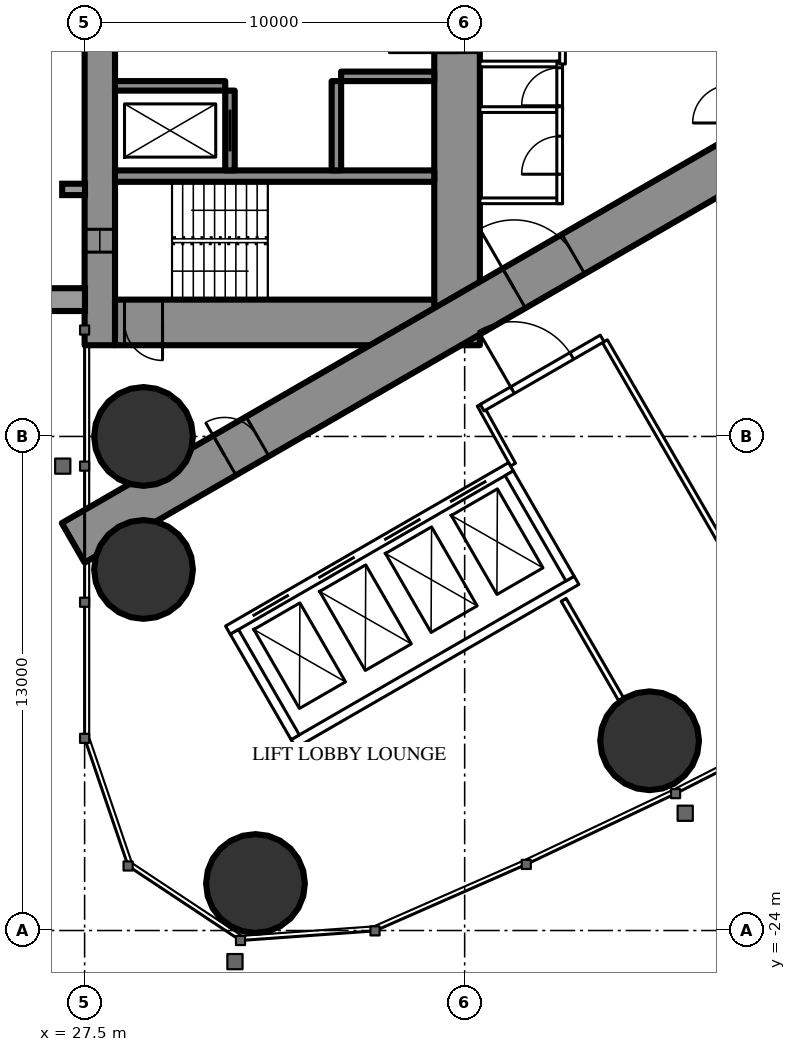
"""IFC4 building model, lengths in metres.
Left out: names, types, materials, properties, quantities, classifications, styles, units other than length and angle.
Written with IfcOpenShell. Run it as: python <this file> out.ifc"""

import sys

from ifc_helpers import new_model, si_unit, direction, frame, frame_2d, origin, origin_2d, place, context, subcontext, project, spatial, rectangle, hollow_circle, extrude, element, fill, save


model = new_model("IFC4")
c1 = context("Model", 3, precision=1e-05, world=origin(), true_north=direction((0.0, 1.0)))
c2 = subcontext(c1, "Body", "Model", "MODEL_VIEW")
j1 = project(units=[si_unit("LENGTHUNIT", "METRE"), si_unit("PLANEANGLEUNIT", "RADIAN")], contexts=[c1])
p1 = place(None, origin())
s1 = spatial("IfcSite", under=j1, at=p1, CompositionType="ELEMENT")
p2 = place(p1, origin())
s2 = spatial("IfcBuilding", under=s1, at=p2, CompositionType="ELEMENT")
p3 = place(p2, frame((0.0, 0.0, 125.6)))
s3 = spatial("IfcBuildingStorey", under=s2, at=p3, CompositionType="ELEMENT", Elevation=125.6)
for number, where, z_axis, x_axis in (
    (1, (31.996, -22.763, 0.0), (0.0, 0.0, 1.0), (1.0, 0.0, 0.0)),
    (2, (29.05, -11.0, 0.0), (0.0, 0.0, 1.0), (1.0, 0.0, 0.0)),
    (3, (29.05, -14.5, 0.0), (0.0, 0.0, 1.0), (1.0, 0.0, 0.0)),
    (4, (42.366, -19.007, 0.0), (0.0, 0.0, 1.0), (1.0, 0.0, 0.0)),
):
    element("IfcColumn", number, at=place(p3, frame(where, z_axis=z_axis, x_axis=x_axis)), inside=s3, PredefinedType="COLUMN", context=c2, shape_type="SweptSolid", body=[
        extrude(hollow_circle(Radius=1.3, WallThickness=0.1, at=origin_2d()), origin(), (0.0, 0.0, 1.0), 3.5),
    ])
p4 = place(p3, frame((27.9, -8.6, 0.0), z_axis=(0.0, 0.0, 1.0), x_axis=(0.0, 1.0, 0.0)))
e5 = element("IfcWall", 5, at=p4, inside=s3, PredefinedType="SHEAR", context=c2, shape_type="SweptSolid", body=[
    extrude(rectangle(XDim=17.2, YDim=0.8, at=frame_2d((8.6, 0.0))), origin(), (0.0, 0.0, 1.0), 3.5),
])
p5 = place(p4, frame((2.45, 0.0, 0.6)))
e6 = element("IfcOpeningElement", 6, at=p5, cuts=e5, PredefinedType="OPENING", context=c2, shape_type="SweptSolid", body=[
    extrude(rectangle(XDim=0.6, YDim=2.1, at=frame_2d((0.3, 1.05))), frame((0.0, 0.41, 0.0), z_axis=(0.0, -1.0, 0.0), x_axis=(1.0, 0.0, 0.0)), (0.0, 0.0, 1.0), 0.82),
])
p6 = place(p4, frame((14.15, 0.0, 0.6)))
e7 = element("IfcOpeningElement", 7, at=p6, cuts=e5, PredefinedType="OPENING", context=c2, shape_type="SweptSolid", body=[
    extrude(rectangle(XDim=0.6, YDim=2.1, at=frame_2d((0.3, 1.05))), frame((0.0, 0.41, 0.0), z_axis=(0.0, -1.0, 0.0), x_axis=(1.0, 0.0, 0.0)), (0.0, 0.0, 1.0), 0.82),
])
p7 = place(p3, frame((37.3, -8.6, 0.0), z_axis=(0.0, 0.0, 1.0), x_axis=(0.0, 1.0, 0.0)))
e8 = element("IfcWall", 8, at=p7, inside=s3, PredefinedType="SHEAR", context=c2, shape_type="SweptSolid", body=[
    extrude(rectangle(XDim=17.2, YDim=1.2, at=frame_2d((8.6, 0.0))), origin(), (0.0, 0.0, 1.0), 3.5),
])
p8 = place(p7, frame((7.7, 0.0, 0.0)))
e9 = element("IfcOpeningElement", 9, at=p8, cuts=e8, PredefinedType="OPENING", context=c2, shape_type="SweptSolid", body=[
    extrude(rectangle(XDim=1.8, YDim=2.2, at=frame_2d((0.9, 1.1))), frame((0.0, 0.61, 0.0), z_axis=(0.0, -1.0, 0.0), x_axis=(1.0, 0.0, 0.0)), (0.0, 0.0, 1.0), 1.22),
])
p9 = place(p3, frame((28.3, -8.0, 0.0), z_axis=(0.0, 0.0, 1.0), x_axis=(1.0, 0.0, 0.0)))
e10 = element("IfcWall", 10, at=p9, inside=s3, PredefinedType="SHEAR", context=c2, shape_type="SweptSolid", body=[
    extrude(rectangle(XDim=8.4, YDim=1.2, at=frame_2d((4.2, 0.0))), origin(), (0.0, 0.0, 1.0), 3.5),
])
p10 = place(p9, frame((0.25, 0.0, 0.0)))
e11 = element("IfcOpeningElement", 11, at=p10, cuts=e10, PredefinedType="OPENING", context=c2, shape_type="SweptSolid", body=[
    extrude(rectangle(XDim=1.0, YDim=2.2, at=frame_2d((0.5, 1.1))), frame((0.0, 0.61, 0.0), z_axis=(0.0, -1.0, 0.0), x_axis=(1.0, 0.0, 0.0)), (0.0, 0.0, 1.0), 1.22),
])
p11 = place(p3, frame((28.3, -4.15, 0.0), z_axis=(0.0, 0.0, 1.0), x_axis=(1.0, 0.0, 0.0)))
e12 = element("IfcWall", 12, at=p11, inside=s3, PredefinedType="SHEAR", context=c2, shape_type="SweptSolid", body=[
    extrude(rectangle(XDim=8.4, YDim=0.3, at=frame_2d((4.2, 0.0))), origin(), (0.0, 0.0, 1.0), 3.5),
])
p12 = place(p3, frame((31.325, -4.0, 0.0), z_axis=(0.0, 0.0, 1.0), x_axis=(0.0, 1.0, 0.0)))
e13 = element("IfcWall", 13, at=p12, inside=s3, PredefinedType="SHEAR", context=c2, shape_type="SweptSolid", body=[
    extrude(rectangle(XDim=2.1, YDim=0.25, at=frame_2d((1.05, 0.0))), origin(), (0.0, 0.0, 1.0), 3.5),
])
p13 = place(p12, frame((0.5, 0.0, 0.0)))
e14 = element("IfcOpeningElement", 14, at=p13, cuts=e13, PredefinedType="OPENING", context=c2, shape_type="SweptSolid", body=[
    extrude(rectangle(XDim=1.1, YDim=2.2, at=frame_2d((0.55, 1.1))), frame((0.0, 0.135, 0.0), z_axis=(0.0, -1.0, 0.0), x_axis=(1.0, 0.0, 0.0)), (0.0, 0.0, 1.0), 0.27),
])
p14 = place(p3, frame((34.125, -4.0, 0.0), z_axis=(0.0, 0.0, 1.0), x_axis=(0.0, 1.0, 0.0)))
e15 = element("IfcWall", 15, at=p14, inside=s3, PredefinedType="SHEAR", context=c2, shape_type="SweptSolid", body=[
    extrude(rectangle(XDim=2.35, YDim=0.25, at=frame_2d((1.175, 0.0))), origin(), (0.0, 0.0, 1.0), 3.5),
])
p15 = place(p3, frame((28.3, -1.775, 0.0), z_axis=(0.0, 0.0, 1.0), x_axis=(1.0, 0.0, 0.0)))
e16 = element("IfcWall", 16, at=p15, inside=s3, PredefinedType="SHEAR", context=c2, shape_type="SweptSolid", body=[
    extrude(rectangle(XDim=2.9, YDim=0.25, at=frame_2d((1.45, 0.0))), origin(), (0.0, 0.0, 1.0), 3.5),
])
p16 = place(p3, frame((34.25, -1.525, 0.0), z_axis=(0.0, 0.0, 1.0), x_axis=(1.0, 0.0, 0.0)))
e17 = element("IfcWall", 17, at=p16, inside=s3, PredefinedType="SHEAR", context=c2, shape_type="SweptSolid", body=[
    extrude(rectangle(XDim=2.45, YDim=0.25, at=frame_2d((1.225, 0.0))), origin(), (0.0, 0.0, 1.0), 3.5),
])
p17 = place(p3, frame((27.2, -13.8, 0.0), z_axis=(0.0, 0.0, 1.0), x_axis=(0.866027159892, 0.499996958321, 0.0)))
e18 = element("IfcWall", 18, at=p17, inside=s3, PredefinedType="SHEAR", context=c2, shape_type="SweptSolid", body=[
    extrude(rectangle(XDim=27.947, YDim=1.2, at=frame_2d((13.973, 0.0))), origin(), (0.0, 0.0, 1.0), 3.5),
])
p18 = place(p17, frame((4.6, 0.0, 0.0)))
e19 = element("IfcOpeningElement", 19, at=p18, cuts=e18, PredefinedType="OPENING", context=c2, shape_type="SweptSolid", body=[
    extrude(rectangle(XDim=1.0, YDim=2.2, at=frame_2d((0.5, 1.1))), frame((0.0, 0.61, 0.0), z_axis=(0.0, -1.0, 0.0), x_axis=(1.0, 0.0, 0.0)), (0.0, 0.0, 1.0), 1.22),
])
p19 = place(p17, frame((13.395, 0.0, 0.0)))
e20 = element("IfcOpeningElement", 20, at=p19, cuts=e18, PredefinedType="OPENING", context=c2, shape_type="SweptSolid", body=[
    extrude(rectangle(XDim=1.8, YDim=2.2, at=frame_2d((0.9, 1.1))), frame((0.0, 0.61, 0.0), z_axis=(0.0, -1.0, 0.0), x_axis=(1.0, 0.0, 0.0)), (0.0, 0.0, 1.0), 1.22),
])
p20 = place(p3, frame((41.19, -8.494, 0.0), z_axis=(0.0, 0.0, 1.0), x_axis=(0.49999258054, -0.866029687369, 0.0)))
e21 = element("IfcWall", 21, at=p20, inside=s3, PredefinedType="PARTITIONING", context=c2, shape_type="SweptSolid", body=[
    extrude(rectangle(XDim=11.318, YDim=0.15, at=frame_2d((5.659, 0.0))), origin(), (0.0, 0.0, 1.0), 3.25),
])
p21 = place(p3, frame((40.105, -15.299, 0.0), z_axis=(0.0, 0.0, 1.0), x_axis=(0.499978822259, -0.866037630414, 0.0)))
e22 = element("IfcWall", 22, at=p21, inside=s3, PredefinedType="PARTITIONING", context=c2, shape_type="SweptSolid", body=[
    extrude(rectangle(XDim=3.023, YDim=0.15, at=frame_2d((1.511, 0.0))), origin(), (0.0, 0.0, 1.0), 3.25),
])
p22 = place(p3, frame((38.773, -11.742, 0.0), z_axis=(0.0, 0.0, 1.0), x_axis=(-0.485528096672, 0.8742210632, 0.0)))
e23 = element("IfcWall", 23, at=p22, inside=s3, PredefinedType="PARTITIONING", context=c2, shape_type="SweptSolid", body=[
    extrude(rectangle(XDim=1.805, YDim=0.15, at=frame_2d((0.903, 0.0))), origin(), (0.0, 0.0, 1.0), 3.25),
])
p23 = place(p3, frame((37.96, -10.243, 0.0), z_axis=(0.0, 0.0, 1.0), x_axis=(0.866042886279, 0.499969718208, 0.0)))
e24 = element("IfcWall", 24, at=p23, inside=s3, PredefinedType="PARTITIONING", context=c2, shape_type="SweptSolid", body=[
    extrude(rectangle(XDim=3.647, YDim=0.2, at=frame_2d((1.823, 0.0))), origin(), (0.0, 0.0, 1.0), 3.25),
])
p24 = place(p23, frame((0.923, 0.0, 0.0)))
e25 = element("IfcOpeningElement", 25, at=p24, cuts=e24, PredefinedType="OPENING", context=c2, shape_type="SweptSolid", body=[
    extrude(rectangle(XDim=1.8, YDim=2.2, at=frame_2d((0.9, 1.1))), frame((0.0, 0.11, 0.0), z_axis=(0.0, -1.0, 0.0), x_axis=(1.0, 0.0, 0.0)), (0.0, 0.0, 1.0), 0.22),
])
for number, where, z_axis, x_axis in (
    (26, (37.9, -1.2, 0.0), (0.0, 0.0, 1.0), (1.0, 0.0, 0.0)),
    (27, (37.9, -2.4, 0.0), (0.0, 0.0, 1.0), (1.0, 0.0, 0.0)),
    (28, (37.9, -4.8, 0.0), (0.0, 0.0, 1.0), (1.0, 0.0, 0.0)),
):
    element("IfcWall", number, at=place(p3, frame(where, z_axis=z_axis, x_axis=x_axis)), inside=s3, PredefinedType="PARTITIONING", context=c2, shape_type="SweptSolid", body=[
        extrude(rectangle(XDim=2.175, YDim=0.15, at=frame_2d((1.087, 0.0))), origin(), (0.0, 0.0, 1.0), 3.25),
    ])
p25 = place(p3, frame((40.0, -2.475, 0.0), z_axis=(0.0, 0.0, 1.0), x_axis=(0.0, 1.0, 0.0)))
e29 = element("IfcWall", 29, at=p25, inside=s3, PredefinedType="PARTITIONING", context=c2, shape_type="SweptSolid", body=[
    extrude(rectangle(XDim=1.35, YDim=0.15, at=frame_2d((0.675, 0.0))), origin(), (0.0, 0.0, 1.0), 3.25),
])
p26 = place(p25, frame((0.175, 0.0, 0.0)))
e30 = element("IfcOpeningElement", 30, at=p26, cuts=e29, PredefinedType="OPENING", context=c2, shape_type="SweptSolid", body=[
    extrude(rectangle(XDim=1.0, YDim=2.2, at=frame_2d((0.5, 1.1))), frame((0.0, 0.085, 0.0), z_axis=(0.0, -1.0, 0.0), x_axis=(1.0, 0.0, 0.0)), (0.0, 0.0, 1.0), 0.17),
])
p27 = place(p3, frame((40.0, -4.875, 0.0), z_axis=(0.0, 0.0, 1.0), x_axis=(0.0, 1.0, 0.0)))
e31 = element("IfcWall", 31, at=p27, inside=s3, PredefinedType="PARTITIONING", context=c2, shape_type="SweptSolid", body=[
    extrude(rectangle(XDim=2.55, YDim=0.15, at=frame_2d((1.275, 0.0))), origin(), (0.0, 0.0, 1.0), 3.25),
])
p28 = place(p27, frame((0.775, 0.0, 0.0)))
e32 = element("IfcOpeningElement", 32, at=p28, cuts=e31, PredefinedType="OPENING", context=c2, shape_type="SweptSolid", body=[
    extrude(rectangle(XDim=1.0, YDim=2.2, at=frame_2d((0.5, 1.1))), frame((0.0, 0.085, 0.0), z_axis=(0.0, -1.0, 0.0), x_axis=(1.0, 0.0, 0.0)), (0.0, 0.0, 1.0), 0.17),
])
p29 = place(p3, frame((40.075, -1.2, 0.0), z_axis=(0.0, 0.0, 1.0), x_axis=(0.0, 1.0, 0.0)))
e33 = element("IfcWall", 33, at=p29, inside=s3, PredefinedType="PARTITIONING", context=c2, shape_type="SweptSolid", body=[
    extrude(rectangle(XDim=6.874, YDim=0.15, at=frame_2d((3.437, 0.0))), origin(), (0.0, 0.0, 1.0), 3.25),
])
p30 = place(p29, frame((2.537, 0.0, 0.0)))
e34 = element("IfcOpeningElement", 34, at=p30, cuts=e33, PredefinedType="OPENING", context=c2, shape_type="SweptSolid", body=[
    extrude(rectangle(XDim=1.8, YDim=2.2, at=frame_2d((0.9, 1.1))), frame((0.0, 0.085, 0.0), z_axis=(0.0, -1.0, 0.0), x_axis=(1.0, 0.0, 0.0)), (0.0, 0.0, 1.0), 0.17),
])
p31 = place(p3, frame((31.271, -16.097, 0.0), z_axis=(0.0, 0.0, 1.0), x_axis=(0.86604045752, 0.499973925258, 0.0)))
e35 = element("IfcWall", 35, at=p31, inside=s3, PredefinedType="PARTITIONING", context=c2, shape_type="SweptSolid", body=[
    extrude(rectangle(XDim=8.6, YDim=0.25, at=frame_2d((4.3, 0.0))), origin(), (0.0, 0.0, 1.0), 3.25),
])
p32 = place(p31, frame((0.75, 0.0, 0.0)))
e36 = element("IfcOpeningElement", 36, at=p32, cuts=e35, PredefinedType="OPENING", context=c2, shape_type="SweptSolid", body=[
    extrude(rectangle(XDim=1.1, YDim=2.2, at=frame_2d((0.55, 1.1))), frame((0.0, 0.135, 0.0), z_axis=(0.0, -1.0, 0.0), x_axis=(1.0, 0.0, 0.0)), (0.0, 0.0, 1.0), 0.27),
])
p33 = place(p31, frame((2.75, 0.0, 0.0)))
e37 = element("IfcOpeningElement", 37, at=p33, cuts=e35, PredefinedType="OPENING", context=c2, shape_type="SweptSolid", body=[
    extrude(rectangle(XDim=1.1, YDim=2.2, at=frame_2d((0.55, 1.1))), frame((0.0, 0.135, 0.0), z_axis=(0.0, -1.0, 0.0), x_axis=(1.0, 0.0, 0.0)), (0.0, 0.0, 1.0), 0.27),
])
p34 = place(p31, frame((4.75, 0.0, 0.0)))
e38 = element("IfcOpeningElement", 38, at=p34, cuts=e35, PredefinedType="OPENING", context=c2, shape_type="SweptSolid", body=[
    extrude(rectangle(XDim=1.1, YDim=2.2, at=frame_2d((0.55, 1.1))), frame((0.0, 0.135, 0.0), z_axis=(0.0, -1.0, 0.0), x_axis=(1.0, 0.0, 0.0)), (0.0, 0.0, 1.0), 0.27),
])
p35 = place(p31, frame((6.75, 0.0, 0.0)))
e39 = element("IfcOpeningElement", 39, at=p35, cuts=e35, PredefinedType="OPENING", context=c2, shape_type="SweptSolid", body=[
    extrude(rectangle(XDim=1.1, YDim=2.2, at=frame_2d((0.55, 1.1))), frame((0.0, 0.135, 0.0), z_axis=(0.0, -1.0, 0.0), x_axis=(1.0, 0.0, 0.0)), (0.0, 0.0, 1.0), 0.27),
])
p36 = place(p3, frame((32.996, -19.086, 0.0), z_axis=(0.0, 0.0, 1.0), x_axis=(0.866028165386, 0.499995216735, 0.0)))
e40 = element("IfcWall", 40, at=p36, inside=s3, PredefinedType="PARTITIONING", context=c2, shape_type="SweptSolid", body=[
    extrude(rectangle(XDim=8.6, YDim=0.25, at=frame_2d((4.3, 0.0))), origin(), (0.0, 0.0, 1.0), 3.25),
])
for number, where, z_axis, x_axis in (
    (41, (31.441, -16.143, 0.0), (0.0, 0.0, 1.0), (0.5, -0.866, 0.0)),
    (42, (38.673, -11.968, 0.0), (0.0, 0.0, 1.0), (0.5, -0.866, 0.0)),
):
    element("IfcWall", number, at=place(p3, frame(where, z_axis=z_axis, x_axis=x_axis)), inside=s3, PredefinedType="PARTITIONING", context=c2, shape_type="SweptSolid", body=[
        extrude(rectangle(XDim=3.201, YDim=0.25, at=frame_2d((1.6, 0.0))), origin(), (0.0, 0.0, 1.0), 3.25),
    ])
p37 = place(p24, origin())
e43 = element("IfcDoor", 43, at=p37, inside=s3, OperationType="DOUBLE_DOOR_SINGLE_SWING", PredefinedType="DOOR", context=c2, shape_type="SweptSolid", body=[
    extrude(rectangle(XDim=1.8, YDim=2.2, at=frame_2d((0.9, 1.1))), frame((0.0, 0.025, 0.0), z_axis=(0.0, -1.0, 0.0), x_axis=(1.0, 0.0, 0.0)), (0.0, 0.0, 1.0), 0.05),
])
fill(e25, e43)
p38 = place(p26, origin())
e44 = element("IfcDoor", 44, at=p38, inside=s3, OperationType="SINGLE_SWING_LEFT", PredefinedType="DOOR", context=c2, shape_type="SweptSolid", body=[
    extrude(rectangle(XDim=1.0, YDim=2.2, at=frame_2d((0.5, 1.1))), frame((0.0, 0.025, 0.0), z_axis=(0.0, -1.0, 0.0), x_axis=(1.0, 0.0, 0.0)), (0.0, 0.0, 1.0), 0.05),
])
fill(e30, e44)
p39 = place(p28, origin())
e45 = element("IfcDoor", 45, at=p39, inside=s3, OperationType="SINGLE_SWING_LEFT", PredefinedType="DOOR", context=c2, shape_type="SweptSolid", body=[
    extrude(rectangle(XDim=1.0, YDim=2.2, at=frame_2d((0.5, 1.1))), frame((0.0, 0.025, 0.0), z_axis=(0.0, -1.0, 0.0), x_axis=(1.0, 0.0, 0.0)), (0.0, 0.0, 1.0), 0.05),
])
fill(e32, e45)
p40 = place(p18, origin())
e46 = element("IfcDoor", 46, at=p40, inside=s3, OperationType="SINGLE_SWING_LEFT", PredefinedType="DOOR", context=c2, shape_type="SweptSolid", body=[
    extrude(rectangle(XDim=1.0, YDim=2.2, at=frame_2d((0.5, 1.1))), frame((0.0, 0.025, 0.0), z_axis=(0.0, -1.0, 0.0), x_axis=(1.0, 0.0, 0.0)), (0.0, 0.0, 1.0), 0.05),
])
fill(e19, e46)
p41 = place(p19, origin())
e47 = element("IfcDoor", 47, at=p41, inside=s3, OperationType="DOUBLE_DOOR_SINGLE_SWING", PredefinedType="DOOR", context=c2, shape_type="SweptSolid", body=[
    extrude(rectangle(XDim=1.8, YDim=2.2, at=frame_2d((0.9, 1.1))), frame((0.0, 0.025, 0.0), z_axis=(0.0, -1.0, 0.0), x_axis=(1.0, 0.0, 0.0)), (0.0, 0.0, 1.0), 0.05),
])
fill(e20, e47)
p42 = place(p8, origin())
e48 = element("IfcDoor", 48, at=p42, inside=s3, OperationType="DOUBLE_DOOR_SINGLE_SWING", PredefinedType="DOOR", context=c2, shape_type="SweptSolid", body=[
    extrude(rectangle(XDim=1.8, YDim=2.2, at=frame_2d((0.9, 1.1))), frame((0.0, 0.025, 0.0), z_axis=(0.0, -1.0, 0.0), x_axis=(1.0, 0.0, 0.0)), (0.0, 0.0, 1.0), 0.05),
])
fill(e9, e48)
p43 = place(p10, origin())
e49 = element("IfcDoor", 49, at=p43, inside=s3, OperationType="SINGLE_SWING_RIGHT", PredefinedType="DOOR", context=c2, shape_type="SweptSolid", body=[
    extrude(rectangle(XDim=1.0, YDim=2.2, at=frame_2d((0.5, 1.1))), frame((0.0, 0.025, 0.0), z_axis=(0.0, -1.0, 0.0), x_axis=(1.0, 0.0, 0.0)), (0.0, 0.0, 1.0), 0.05),
])
fill(e11, e49)
p44 = place(p13, origin())
e50 = element("IfcDoor", 50, at=p44, inside=s3, OperationType="SLIDING_TO_LEFT", PredefinedType="USERDEFINED", context=c2, shape_type="SweptSolid", body=[
    extrude(rectangle(XDim=1.1, YDim=2.2, at=frame_2d((0.55, 1.1))), frame((0.0, 0.025, 0.0), z_axis=(0.0, -1.0, 0.0), x_axis=(1.0, 0.0, 0.0)), (0.0, 0.0, 1.0), 0.05),
])
fill(e14, e50)
p45 = place(p32, origin())
e51 = element("IfcDoor", 51, at=p45, inside=s3, OperationType="DOUBLE_DOOR_SLIDING", PredefinedType="USERDEFINED", context=c2, shape_type="SweptSolid", body=[
    extrude(rectangle(XDim=1.1, YDim=2.2, at=frame_2d((0.55, 1.1))), frame((0.0, 0.025, 0.0), z_axis=(0.0, -1.0, 0.0), x_axis=(1.0, 0.0, 0.0)), (0.0, 0.0, 1.0), 0.05),
])
fill(e36, e51)
p46 = place(p33, origin())
e52 = element("IfcDoor", 52, at=p46, inside=s3, OperationType="DOUBLE_DOOR_SLIDING", PredefinedType="USERDEFINED", context=c2, shape_type="SweptSolid", body=[
    extrude(rectangle(XDim=1.1, YDim=2.2, at=frame_2d((0.55, 1.1))), frame((0.0, 0.025, 0.0), z_axis=(0.0, -1.0, 0.0), x_axis=(1.0, 0.0, 0.0)), (0.0, 0.0, 1.0), 0.05),
])
fill(e37, e52)
p47 = place(p34, origin())
e53 = element("IfcDoor", 53, at=p47, inside=s3, OperationType="DOUBLE_DOOR_SLIDING", PredefinedType="USERDEFINED", context=c2, shape_type="SweptSolid", body=[
    extrude(rectangle(XDim=1.1, YDim=2.2, at=frame_2d((0.55, 1.1))), frame((0.0, 0.025, 0.0), z_axis=(0.0, -1.0, 0.0), x_axis=(1.0, 0.0, 0.0)), (0.0, 0.0, 1.0), 0.05),
])
fill(e38, e53)
p48 = place(p35, origin())
e54 = element("IfcDoor", 54, at=p48, inside=s3, OperationType="DOUBLE_DOOR_SLIDING", PredefinedType="USERDEFINED", context=c2, shape_type="SweptSolid", body=[
    extrude(rectangle(XDim=1.1, YDim=2.2, at=frame_2d((0.55, 1.1))), frame((0.0, 0.025, 0.0), z_axis=(0.0, -1.0, 0.0), x_axis=(1.0, 0.0, 0.0)), (0.0, 0.0, 1.0), 0.05),
])
fill(e39, e54)
p49 = place(p5, origin())
e55 = element("IfcWindow", 55, at=p49, inside=s3, PartitioningType="SINGLE_PANEL", PredefinedType="WINDOW", context=c2, shape_type="SweptSolid", body=[
    extrude(rectangle(XDim=0.6, YDim=2.1, at=frame_2d((0.3, 1.05))), frame((0.0, 0.03, 0.0), z_axis=(0.0, -1.0, 0.0), x_axis=(1.0, 0.0, 0.0)), (0.0, 0.0, 1.0), 0.06),
])
fill(e6, e55)
save(model, sys.argv[1])
